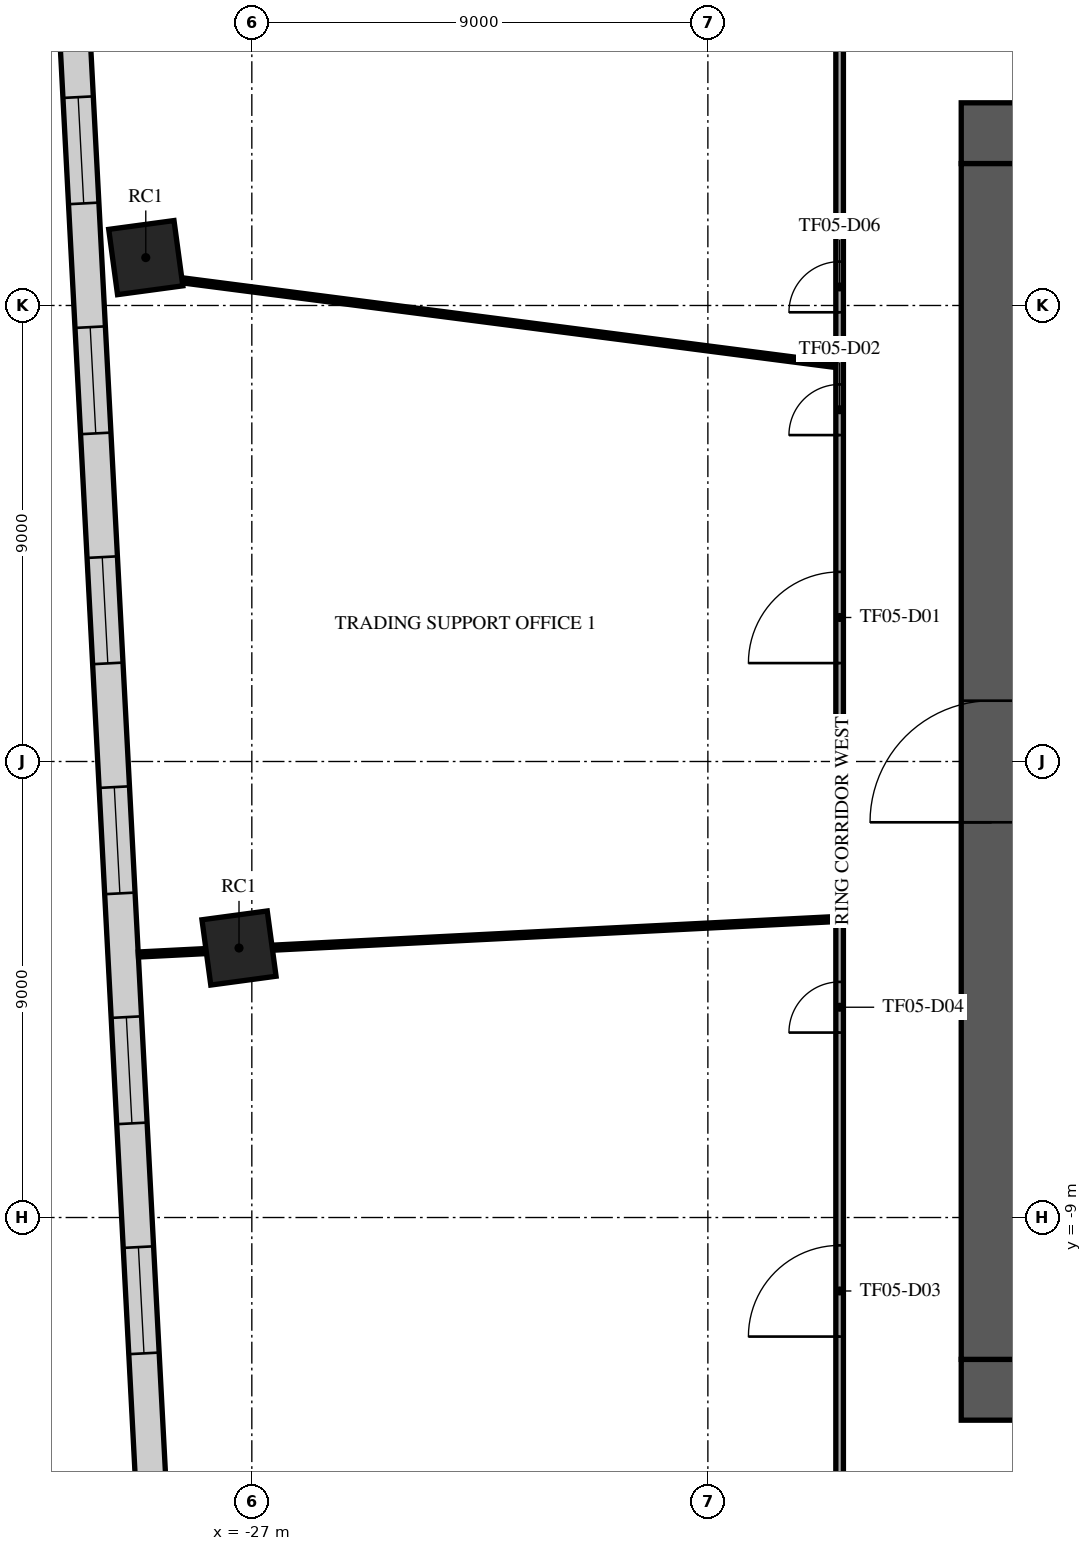
"""IFC4 building model, lengths in metres.
Left out: names, types, materials, properties, quantities, classifications, styles, units other than length and angle.
Written with IfcOpenShell. Run it as: python <this file> out.ifc"""

import sys

from ifc_helpers import new_model, si_unit, direction, frame, frame_2d, origin, origin_2d, place, context, subcontext, project, spatial, rectangle, extrude, element, fill, save


model = new_model("IFC4")
c1 = context("Model", 3, precision=1e-05, world=origin(), true_north=direction((0.0, 1.0)))
c2 = subcontext(c1, "Body", "Model", "MODEL_VIEW")
j1 = project(units=[si_unit("LENGTHUNIT", "METRE"), si_unit("PLANEANGLEUNIT", "RADIAN")], contexts=[c1])
p1 = place(None, origin())
s1 = spatial("IfcSite", under=j1, at=p1, CompositionType="ELEMENT")
p2 = place(p1, origin())
s2 = spatial("IfcBuilding", under=s1, at=p2, CompositionType="ELEMENT")
p3 = place(p2, frame((0.0, 0.0, 27.3)))
s3 = spatial("IfcBuildingStorey", under=s2, at=p3, CompositionType="ELEMENT", Elevation=27.3)
for number, where, z_axis, x_axis in (
    (1, (-29.093, 9.945, 0.0), (0.0, 0.0, 1.0), (0.991, 0.134, 0.0)),
    (2, (-27.253, -3.681, 0.0), (0.0, 0.0, 1.0), (0.991, 0.134, 0.0)),
):
    element("IfcColumn", number, at=place(p3, frame(where, z_axis=z_axis, x_axis=x_axis)), inside=s3, PredefinedType="COLUMN", context=c2, shape_type="SweptSolid", body=[
        extrude(rectangle(XDim=1.3, YDim=1.3, at=origin_2d()), origin(), (0.0, 0.0, 1.0), 4.8),
    ])
p4 = place(p3, frame((-13.0, 12.4, 0.0), z_axis=(0.0, 0.0, 1.0), x_axis=(1.0, 0.0, 0.0)))
e3 = element("IfcWall", 3, at=p4, inside=s3, PredefinedType="SHEAR", context=c2, shape_type="SweptSolid", body=[
    extrude(rectangle(XDim=26.0, YDim=1.2, at=frame_2d((13.0, 0.0))), origin(), (0.0, 0.0, 1.0), 4.35),
])
p5 = place(p4, frame((11.8, 0.0, 0.0)))
e4 = element("IfcOpeningElement", 4, at=p5, cuts=e3, PredefinedType="OPENING", context=c2, shape_type="SweptSolid", body=[
    extrude(rectangle(XDim=2.4, YDim=2.4, at=frame_2d((1.2, 1.2))), frame((0.0, 0.61, 0.0), z_axis=(0.0, -1.0, 0.0), x_axis=(1.0, 0.0, 0.0)), (0.0, 0.0, 1.0), 1.22),
])
p6 = place(p4, frame((22.625, 0.0, 0.0)))
e5 = element("IfcOpeningElement", 5, at=p6, cuts=e3, PredefinedType="OPENING", context=c2, shape_type="SweptSolid", body=[
    extrude(rectangle(XDim=1.2, YDim=2.1, at=frame_2d((0.6, 1.05))), frame((0.0, 0.61, 0.0), z_axis=(0.0, -1.0, 0.0), x_axis=(1.0, 0.0, 0.0)), (0.0, 0.0, 1.0), 1.22),
])
p7 = place(p4, frame((1.6, 0.0, 0.0)))
e6 = element("IfcOpeningElement", 6, at=p7, cuts=e3, PredefinedType="OPENING", context=c2, shape_type="SweptSolid", body=[
    extrude(rectangle(XDim=1.0, YDim=2.1, at=frame_2d((0.5, 1.05))), frame((0.0, 0.61, 0.0), z_axis=(0.0, -1.0, 0.0), x_axis=(1.0, 0.0, 0.0)), (0.0, 0.0, 1.0), 1.22),
])
p8 = place(p3, frame((-13.0, -12.4, 0.0), z_axis=(0.0, 0.0, 1.0), x_axis=(1.0, 0.0, 0.0)))
e7 = element("IfcWall", 7, at=p8, inside=s3, PredefinedType="SHEAR", context=c2, shape_type="SweptSolid", body=[
    extrude(rectangle(XDim=26.0, YDim=1.2, at=frame_2d((13.0, 0.0))), origin(), (0.0, 0.0, 1.0), 4.35),
])
p9 = place(p8, frame((7.9, 0.0, 0.0)))
e8 = element("IfcOpeningElement", 8, at=p9, cuts=e7, PredefinedType="OPENING", context=c2, shape_type="SweptSolid", body=[
    extrude(rectangle(XDim=2.0, YDim=2.1, at=frame_2d((1.0, 1.05))), frame((0.0, 0.61, 0.0), z_axis=(0.0, -1.0, 0.0), x_axis=(1.0, 0.0, 0.0)), (0.0, 0.0, 1.0), 1.22),
])
p10 = place(p8, frame((18.025, 0.0, 0.0)))
e9 = element("IfcOpeningElement", 9, at=p10, cuts=e7, PredefinedType="OPENING", context=c2, shape_type="SweptSolid", body=[
    extrude(rectangle(XDim=1.2, YDim=2.1, at=frame_2d((0.6, 1.05))), frame((0.0, 0.61, 0.0), z_axis=(0.0, -1.0, 0.0), x_axis=(1.0, 0.0, 0.0)), (0.0, 0.0, 1.0), 1.22),
])
p11 = place(p8, frame((2.175, 0.0, 0.0)))
e10 = element("IfcOpeningElement", 10, at=p11, cuts=e7, PredefinedType="OPENING", context=c2, shape_type="SweptSolid", body=[
    extrude(rectangle(XDim=1.2, YDim=2.1, at=frame_2d((0.6, 1.05))), frame((0.0, 0.61, 0.0), z_axis=(0.0, -1.0, 0.0), x_axis=(1.0, 0.0, 0.0)), (0.0, 0.0, 1.0), 1.22),
])
p12 = place(p8, frame((22.625, 0.0, 0.0)))
e11 = element("IfcOpeningElement", 11, at=p12, cuts=e7, PredefinedType="OPENING", context=c2, shape_type="SweptSolid", body=[
    extrude(rectangle(XDim=1.2, YDim=2.1, at=frame_2d((0.6, 1.05))), frame((0.0, 0.61, 0.0), z_axis=(0.0, -1.0, 0.0), x_axis=(1.0, 0.0, 0.0)), (0.0, 0.0, 1.0), 1.22),
])
p13 = place(p3, frame((-12.4, -11.8, 0.0), z_axis=(0.0, 0.0, 1.0), x_axis=(0.0, 1.0, 0.0)))
e12 = element("IfcWall", 12, at=p13, inside=s3, PredefinedType="SHEAR", context=c2, shape_type="SweptSolid", body=[
    extrude(rectangle(XDim=23.6, YDim=1.2, at=frame_2d((11.8, 0.0))), origin(), (0.0, 0.0, 1.0), 4.35),
])
p14 = place(p13, frame((10.6, 0.0, 0.0)))
e13 = element("IfcOpeningElement", 13, at=p14, cuts=e12, PredefinedType="OPENING", context=c2, shape_type="SweptSolid", body=[
    extrude(rectangle(XDim=2.4, YDim=2.4, at=frame_2d((1.2, 1.2))), frame((0.0, 0.61, 0.0), z_axis=(0.0, -1.0, 0.0), x_axis=(1.0, 0.0, 0.0)), (0.0, 0.0, 1.0), 1.22),
])
p15 = place(p3, frame((-30.961, 23.287, 0.0), z_axis=(0.0, 0.0, 1.0), x_axis=(0.052335269612, -0.998629570739, 0.0)))
e14 = element("IfcWall", 14, at=p15, inside=s3, PredefinedType="STANDARD", context=c2, shape_type="SweptSolid", body=[
    extrude(rectangle(XDim=49.751, YDim=0.6, at=frame_2d((24.876, 0.0))), origin(), (0.0, 0.0, 1.0), 4.35),
])
p16 = place(p15, frame((1.161, 0.0, 0.9)))
e15 = element("IfcOpeningElement", 15, at=p16, cuts=e14, PredefinedType="OPENING", context=c2, shape_type="SweptSolid", body=[
    extrude(rectangle(XDim=2.1, YDim=2.7, at=frame_2d((1.05, 1.35))), frame((0.0, 0.31, 0.0), z_axis=(0.0, -1.0, 0.0), x_axis=(1.0, 0.0, 0.0)), (0.0, 0.0, 1.0), 0.62),
])
p17 = place(p15, frame((5.644, 0.0, 0.9)))
e16 = element("IfcOpeningElement", 16, at=p17, cuts=e14, PredefinedType="OPENING", context=c2, shape_type="SweptSolid", body=[
    extrude(rectangle(XDim=2.1, YDim=2.7, at=frame_2d((1.05, 1.35))), frame((0.0, 0.31, 0.0), z_axis=(0.0, -1.0, 0.0), x_axis=(1.0, 0.0, 0.0)), (0.0, 0.0, 1.0), 0.62),
])
p18 = place(p15, frame((10.189, 0.0, 0.9)))
e17 = element("IfcOpeningElement", 17, at=p18, cuts=e14, PredefinedType="OPENING", context=c2, shape_type="SweptSolid", body=[
    extrude(rectangle(XDim=2.1, YDim=2.7, at=frame_2d((1.05, 1.35))), frame((0.0, 0.31, 0.0), z_axis=(0.0, -1.0, 0.0), x_axis=(1.0, 0.0, 0.0)), (0.0, 0.0, 1.0), 0.62),
])
p19 = place(p15, frame((14.735, 0.0, 0.9)))
e18 = element("IfcOpeningElement", 18, at=p19, cuts=e14, PredefinedType="OPENING", context=c2, shape_type="SweptSolid", body=[
    extrude(rectangle(XDim=2.1, YDim=2.7, at=frame_2d((1.05, 1.35))), frame((0.0, 0.31, 0.0), z_axis=(0.0, -1.0, 0.0), x_axis=(1.0, 0.0, 0.0)), (0.0, 0.0, 1.0), 0.62),
])
p20 = place(p15, frame((19.28, 0.0, 0.9)))
e19 = element("IfcOpeningElement", 19, at=p20, cuts=e14, PredefinedType="OPENING", context=c2, shape_type="SweptSolid", body=[
    extrude(rectangle(XDim=2.1, YDim=2.7, at=frame_2d((1.05, 1.35))), frame((0.0, 0.31, 0.0), z_axis=(0.0, -1.0, 0.0), x_axis=(1.0, 0.0, 0.0)), (0.0, 0.0, 1.0), 0.62),
])
p21 = place(p15, frame((23.826, 0.0, 0.9)))
e20 = element("IfcOpeningElement", 20, at=p21, cuts=e14, PredefinedType="OPENING", context=c2, shape_type="SweptSolid", body=[
    extrude(rectangle(XDim=2.1, YDim=2.7, at=frame_2d((1.05, 1.35))), frame((0.0, 0.31, 0.0), z_axis=(0.0, -1.0, 0.0), x_axis=(1.0, 0.0, 0.0)), (0.0, 0.0, 1.0), 0.62),
])
p22 = place(p15, frame((28.371, 0.0, 0.9)))
e21 = element("IfcOpeningElement", 21, at=p22, cuts=e14, PredefinedType="OPENING", context=c2, shape_type="SweptSolid", body=[
    extrude(rectangle(XDim=2.1, YDim=2.7, at=frame_2d((1.05, 1.35))), frame((0.0, 0.31, 0.0), z_axis=(0.0, -1.0, 0.0), x_axis=(1.0, 0.0, 0.0)), (0.0, 0.0, 1.0), 0.62),
])
p23 = place(p15, frame((32.917, 0.0, 0.9)))
e22 = element("IfcOpeningElement", 22, at=p23, cuts=e14, PredefinedType="OPENING", context=c2, shape_type="SweptSolid", body=[
    extrude(rectangle(XDim=2.1, YDim=2.7, at=frame_2d((1.05, 1.35))), frame((0.0, 0.31, 0.0), z_axis=(0.0, -1.0, 0.0), x_axis=(1.0, 0.0, 0.0)), (0.0, 0.0, 1.0), 0.62),
])
p24 = place(p15, frame((37.462, 0.0, 0.9)))
e23 = element("IfcOpeningElement", 23, at=p24, cuts=e14, PredefinedType="OPENING", context=c2, shape_type="SweptSolid", body=[
    extrude(rectangle(XDim=2.1, YDim=2.7, at=frame_2d((1.05, 1.35))), frame((0.0, 0.31, 0.0), z_axis=(0.0, -1.0, 0.0), x_axis=(1.0, 0.0, 0.0)), (0.0, 0.0, 1.0), 0.62),
])
p25 = place(p15, frame((42.008, 0.0, 0.9)))
e24 = element("IfcOpeningElement", 24, at=p25, cuts=e14, PredefinedType="OPENING", context=c2, shape_type="SweptSolid", body=[
    extrude(rectangle(XDim=2.1, YDim=2.7, at=frame_2d((1.05, 1.35))), frame((0.0, 0.31, 0.0), z_axis=(0.0, -1.0, 0.0), x_axis=(1.0, 0.0, 0.0)), (0.0, 0.0, 1.0), 0.62),
])
p26 = place(p15, frame((46.491, 0.0, 0.9)))
e25 = element("IfcOpeningElement", 25, at=p26, cuts=e14, PredefinedType="OPENING", context=c2, shape_type="SweptSolid", body=[
    extrude(rectangle(XDim=2.1, YDim=2.7, at=frame_2d((1.05, 1.35))), frame((0.0, 0.31, 0.0), z_axis=(0.0, -1.0, 0.0), x_axis=(1.0, 0.0, 0.0)), (0.0, 0.0, 1.0), 0.62),
])
p27 = place(p3, frame((-15.4, -15.4, 0.0), z_axis=(0.0, 0.0, 1.0), x_axis=(0.0, 1.0, 0.0)))
e26 = element("IfcWall", 26, at=p27, inside=s3, PredefinedType="PARTITIONING", context=c2, shape_type="SweptSolid", body=[
    extrude(rectangle(XDim=30.8, YDim=0.15, at=frame_2d((15.4, 0.0))), origin(), (0.0, 0.0, 1.0), 3.85),
])
p28 = place(p27, frame((17.342, 0.0, 0.0)))
e27 = element("IfcOpeningElement", 27, at=p28, cuts=e26, PredefinedType="OPENING", context=c2, shape_type="SweptSolid", body=[
    extrude(rectangle(XDim=1.8, YDim=2.1, at=frame_2d((0.9, 1.05))), frame((0.0, 0.085, 0.0), z_axis=(0.0, -1.0, 0.0), x_axis=(1.0, 0.0, 0.0)), (0.0, 0.0, 1.0), 0.17),
])
p29 = place(p27, frame((21.842, 0.0, 0.0)))
e28 = element("IfcOpeningElement", 28, at=p29, cuts=e26, PredefinedType="OPENING", context=c2, shape_type="SweptSolid", body=[
    extrude(rectangle(XDim=1.0, YDim=2.1, at=frame_2d((0.5, 1.05))), frame((0.0, 0.085, 0.0), z_axis=(0.0, -1.0, 0.0), x_axis=(1.0, 0.0, 0.0)), (0.0, 0.0, 1.0), 0.17),
])
p30 = place(p27, frame((4.05, 0.0, 0.0)))
e29 = element("IfcOpeningElement", 29, at=p30, cuts=e26, PredefinedType="OPENING", context=c2, shape_type="SweptSolid", body=[
    extrude(rectangle(XDim=1.8, YDim=2.1, at=frame_2d((0.9, 1.05))), frame((0.0, 0.085, 0.0), z_axis=(0.0, -1.0, 0.0), x_axis=(1.0, 0.0, 0.0)), (0.0, 0.0, 1.0), 0.17),
])
p31 = place(p27, frame((10.05, 0.0, 0.0)))
e30 = element("IfcOpeningElement", 30, at=p31, cuts=e26, PredefinedType="OPENING", context=c2, shape_type="SweptSolid", body=[
    extrude(rectangle(XDim=1.0, YDim=2.1, at=frame_2d((0.5, 1.05))), frame((0.0, 0.085, 0.0), z_axis=(0.0, -1.0, 0.0), x_axis=(1.0, 0.0, 0.0)), (0.0, 0.0, 1.0), 0.17),
])
p32 = place(p27, frame((24.266, 0.0, 0.0)))
e31 = element("IfcOpeningElement", 31, at=p32, cuts=e26, PredefinedType="OPENING", context=c2, shape_type="SweptSolid", body=[
    extrude(rectangle(XDim=1.0, YDim=2.1, at=frame_2d((0.5, 1.05))), frame((0.0, 0.085, 0.0), z_axis=(0.0, -1.0, 0.0), x_axis=(1.0, 0.0, 0.0)), (0.0, 0.0, 1.0), 0.17),
])
p33 = place(p3, frame((-29.239, -3.809, 0.0), z_axis=(0.0, 0.0, 1.0), x_axis=(0.998716183263, 0.050655555363, 0.0)))
e32 = element("IfcWall", 32, at=p33, inside=s3, PredefinedType="PARTITIONING", context=c2, shape_type="SweptSolid", body=[
    extrude(rectangle(XDim=1.34, YDim=0.1, at=frame_2d((0.67, 0.0))), origin(), (0.0, 0.0, 1.0), 4.35),
])
p34 = place(p3, frame((-28.377, 9.497, 0.0), z_axis=(0.0, 0.0, 1.0), x_axis=(0.991714249214, -0.128463410764, 0.0)))
e33 = element("IfcWall", 33, at=p34, inside=s3, PredefinedType="PARTITIONING", context=c2, shape_type="SweptSolid", body=[
    extrude(rectangle(XDim=13.003, YDim=0.1, at=frame_2d((6.501, 0.0))), origin(), (0.0, 0.0, 1.0), 3.85),
])
p35 = place(p3, frame((-26.598, -3.675, 0.0), z_axis=(0.0, 0.0, 1.0), x_axis=(0.998709825914, 0.050780740671, 0.0)))
e34 = element("IfcWall", 34, at=p35, inside=s3, PredefinedType="PARTITIONING", context=c2, shape_type="SweptSolid", body=[
    extrude(rectangle(XDim=11.135, YDim=0.1, at=frame_2d((5.567, 0.0))), origin(), (0.0, 0.0, 1.0), 3.85),
])
p36 = place(p14, origin())
e35 = element("IfcDoor", 35, at=p36, inside=s3, OperationType="SINGLE_SWING_LEFT", PredefinedType="DOOR", context=c2, shape_type="SweptSolid", body=[
    extrude(rectangle(XDim=2.4, YDim=2.4, at=frame_2d((1.2, 1.2))), frame((0.0, 0.025, 0.0), z_axis=(0.0, -1.0, 0.0), x_axis=(1.0, 0.0, 0.0)), (0.0, 0.0, 1.0), 0.05),
])
fill(e13, e35)
p37 = place(p18, origin())
e36 = element("IfcWindow", 36, at=p37, inside=s3, PartitioningType="SINGLE_PANEL", PredefinedType="WINDOW", context=c2, shape_type="SweptSolid", body=[
    extrude(rectangle(XDim=2.1, YDim=2.7, at=frame_2d((1.05, 1.35))), frame((0.0, 0.03, 0.0), z_axis=(0.0, -1.0, 0.0), x_axis=(1.0, 0.0, 0.0)), (0.0, 0.0, 1.0), 0.06),
])
fill(e17, e36)
p38 = place(p19, origin())
e37 = element("IfcWindow", 37, at=p38, inside=s3, PartitioningType="SINGLE_PANEL", PredefinedType="WINDOW", context=c2, shape_type="SweptSolid", body=[
    extrude(rectangle(XDim=2.1, YDim=2.7, at=frame_2d((1.05, 1.35))), frame((0.0, 0.03, 0.0), z_axis=(0.0, -1.0, 0.0), x_axis=(1.0, 0.0, 0.0)), (0.0, 0.0, 1.0), 0.06),
])
fill(e18, e37)
p39 = place(p20, origin())
e38 = element("IfcWindow", 38, at=p39, inside=s3, PartitioningType="SINGLE_PANEL", PredefinedType="WINDOW", context=c2, shape_type="SweptSolid", body=[
    extrude(rectangle(XDim=2.1, YDim=2.7, at=frame_2d((1.05, 1.35))), frame((0.0, 0.03, 0.0), z_axis=(0.0, -1.0, 0.0), x_axis=(1.0, 0.0, 0.0)), (0.0, 0.0, 1.0), 0.06),
])
fill(e19, e38)
p40 = place(p21, origin())
e39 = element("IfcWindow", 39, at=p40, inside=s3, PartitioningType="SINGLE_PANEL", PredefinedType="WINDOW", context=c2, shape_type="SweptSolid", body=[
    extrude(rectangle(XDim=2.1, YDim=2.7, at=frame_2d((1.05, 1.35))), frame((0.0, 0.03, 0.0), z_axis=(0.0, -1.0, 0.0), x_axis=(1.0, 0.0, 0.0)), (0.0, 0.0, 1.0), 0.06),
])
fill(e20, e39)
p41 = place(p22, origin())
e40 = element("IfcWindow", 40, at=p41, inside=s3, PartitioningType="SINGLE_PANEL", PredefinedType="WINDOW", context=c2, shape_type="SweptSolid", body=[
    extrude(rectangle(XDim=2.1, YDim=2.7, at=frame_2d((1.05, 1.35))), frame((0.0, 0.03, 0.0), z_axis=(0.0, -1.0, 0.0), x_axis=(1.0, 0.0, 0.0)), (0.0, 0.0, 1.0), 0.06),
])
fill(e21, e40)
p42 = place(p23, origin())
e41 = element("IfcWindow", 41, at=p42, inside=s3, PartitioningType="SINGLE_PANEL", PredefinedType="WINDOW", context=c2, shape_type="SweptSolid", body=[
    extrude(rectangle(XDim=2.1, YDim=2.7, at=frame_2d((1.05, 1.35))), frame((0.0, 0.03, 0.0), z_axis=(0.0, -1.0, 0.0), x_axis=(1.0, 0.0, 0.0)), (0.0, 0.0, 1.0), 0.06),
])
fill(e22, e41)
p43 = place(p28, origin())
e42 = element("IfcDoor", 42, at=p43, inside=s3, OperationType="DOUBLE_DOOR_SINGLE_SWING", PredefinedType="DOOR", context=c2, shape_type="SweptSolid", body=[
    extrude(rectangle(XDim=1.8, YDim=2.1, at=frame_2d((0.9, 1.05))), frame((0.0, 0.025, 0.0), z_axis=(0.0, -1.0, 0.0), x_axis=(1.0, 0.0, 0.0)), (0.0, 0.0, 1.0), 0.05),
])
fill(e27, e42)
p44 = place(p29, origin())
e43 = element("IfcDoor", 43, at=p44, inside=s3, OperationType="SINGLE_SWING_RIGHT", PredefinedType="DOOR", context=c2, shape_type="SweptSolid", body=[
    extrude(rectangle(XDim=1.0, YDim=2.1, at=frame_2d((0.5, 1.05))), frame((0.0, 0.025, 0.0), z_axis=(0.0, -1.0, 0.0), x_axis=(1.0, 0.0, 0.0)), (0.0, 0.0, 1.0), 0.05),
])
fill(e28, e43)
p45 = place(p30, origin())
e44 = element("IfcDoor", 44, at=p45, inside=s3, OperationType="DOUBLE_DOOR_SINGLE_SWING", PredefinedType="DOOR", context=c2, shape_type="SweptSolid", body=[
    extrude(rectangle(XDim=1.8, YDim=2.1, at=frame_2d((0.9, 1.05))), frame((0.0, 0.025, 0.0), z_axis=(0.0, -1.0, 0.0), x_axis=(1.0, 0.0, 0.0)), (0.0, 0.0, 1.0), 0.05),
])
fill(e29, e44)
p46 = place(p31, origin())
e45 = element("IfcDoor", 45, at=p46, inside=s3, OperationType="SINGLE_SWING_RIGHT", PredefinedType="DOOR", context=c2, shape_type="SweptSolid", body=[
    extrude(rectangle(XDim=1.0, YDim=2.1, at=frame_2d((0.5, 1.05))), frame((0.0, 0.025, 0.0), z_axis=(0.0, -1.0, 0.0), x_axis=(1.0, 0.0, 0.0)), (0.0, 0.0, 1.0), 0.05),
])
fill(e30, e45)
p47 = place(p32, origin())
e46 = element("IfcDoor", 46, at=p47, inside=s3, OperationType="SINGLE_SWING_LEFT", PredefinedType="DOOR", context=c2, shape_type="SweptSolid", body=[
    extrude(rectangle(XDim=1.0, YDim=2.1, at=frame_2d((0.5, 1.05))), frame((0.0, 0.025, 0.0), z_axis=(0.0, -1.0, 0.0), x_axis=(1.0, 0.0, 0.0)), (0.0, 0.0, 1.0), 0.05),
])
fill(e31, e46)
save(model, sys.argv[1])
